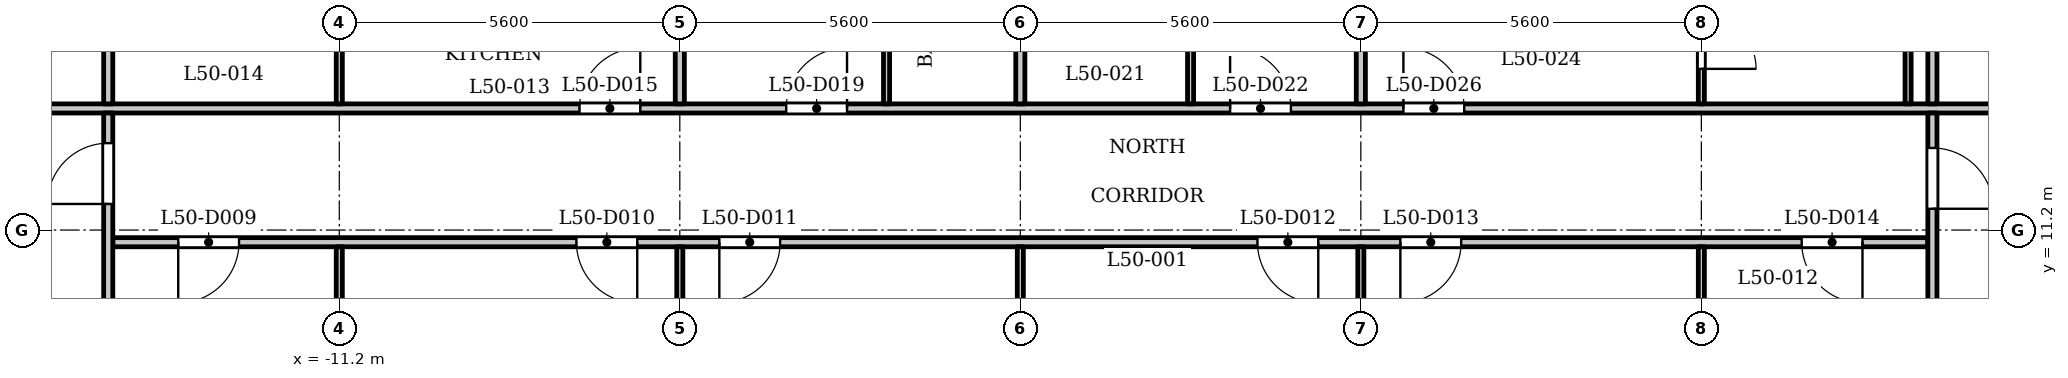
"""IFC4 building model, lengths in metres.
Left out: names, types, materials, properties, quantities, classifications, styles, units other than length and angle.
Written with IfcOpenShell. Run it as: python <this file> out.ifc"""

import sys

from ifc_helpers import new_model, si_unit, direction, frame, frame_2d, origin, place, context, subcontext, project, spatial, rectangle, extrude, element, fill, save


model = new_model("IFC4")
c1 = context("Model", 3, precision=1e-05, world=origin(), true_north=direction((0.0, 1.0)))
c2 = subcontext(c1, "Body", "Model", "MODEL_VIEW")
j1 = project(units=[si_unit("LENGTHUNIT", "METRE"), si_unit("PLANEANGLEUNIT", "RADIAN")], contexts=[c1])
p1 = place(None, origin())
s1 = spatial("IfcSite", under=j1, at=p1, CompositionType="ELEMENT")
p2 = place(p1, origin())
s2 = spatial("IfcBuilding", under=s1, at=p2, CompositionType="ELEMENT")
p3 = place(p2, frame((0.0, 0.0, 195.9)))
s3 = spatial("IfcBuildingStorey", under=s2, at=p3, CompositionType="ELEMENT", Elevation=195.9)
p4 = place(p3, frame((-14.925, 11.0, 0.0), z_axis=(0.0, 0.0, 1.0), x_axis=(1.0, 0.0, 0.0)))
e1 = element("IfcWall", 1, at=p4, inside=s3, PredefinedType="PARTITIONING", context=c2, shape_type="SweptSolid", body=[
    extrude(rectangle(XDim=29.85, YDim=0.15, at=frame_2d((14.925, 0.0))), origin(), (0.0, 0.0, 1.0), 3.2),
])
p5 = place(p4, frame((1.076, 0.0, 0.0)))
e2 = element("IfcOpeningElement", 2, at=p5, cuts=e1, PredefinedType="OPENING", context=c2, shape_type="SweptSolid", body=[
    extrude(rectangle(XDim=1.0, YDim=2.1, at=frame_2d((0.5, 1.05))), frame((0.0, 0.085, 0.0), z_axis=(0.0, -1.0, 0.0), x_axis=(1.0, 0.0, 0.0)), (0.0, 0.0, 1.0), 0.17),
])
p6 = place(p4, frame((7.625, 0.0, 0.0)))
e3 = element("IfcOpeningElement", 3, at=p6, cuts=e1, PredefinedType="OPENING", context=c2, shape_type="SweptSolid", body=[
    extrude(rectangle(XDim=1.0, YDim=2.1, at=frame_2d((0.5, 1.05))), frame((0.0, 0.085, 0.0), z_axis=(0.0, -1.0, 0.0), x_axis=(1.0, 0.0, 0.0)), (0.0, 0.0, 1.0), 0.17),
])
p7 = place(p4, frame((9.975, 0.0, 0.0)))
e4 = element("IfcOpeningElement", 4, at=p7, cuts=e1, PredefinedType="OPENING", context=c2, shape_type="SweptSolid", body=[
    extrude(rectangle(XDim=1.0, YDim=2.1, at=frame_2d((0.5, 1.05))), frame((0.0, 0.085, 0.0), z_axis=(0.0, -1.0, 0.0), x_axis=(1.0, 0.0, 0.0)), (0.0, 0.0, 1.0), 0.17),
])
p8 = place(p4, frame((18.825, 0.0, 0.0)))
e5 = element("IfcOpeningElement", 5, at=p8, cuts=e1, PredefinedType="OPENING", context=c2, shape_type="SweptSolid", body=[
    extrude(rectangle(XDim=1.0, YDim=2.1, at=frame_2d((0.5, 1.05))), frame((0.0, 0.085, 0.0), z_axis=(0.0, -1.0, 0.0), x_axis=(1.0, 0.0, 0.0)), (0.0, 0.0, 1.0), 0.17),
])
p9 = place(p4, frame((21.175, 0.0, 0.0)))
e6 = element("IfcOpeningElement", 6, at=p9, cuts=e1, PredefinedType="OPENING", context=c2, shape_type="SweptSolid", body=[
    extrude(rectangle(XDim=1.0, YDim=2.1, at=frame_2d((0.5, 1.05))), frame((0.0, 0.085, 0.0), z_axis=(0.0, -1.0, 0.0), x_axis=(1.0, 0.0, 0.0)), (0.0, 0.0, 1.0), 0.17),
])
p10 = place(p4, frame((27.775, 0.0, 0.0)))
e7 = element("IfcOpeningElement", 7, at=p10, cuts=e1, PredefinedType="OPENING", context=c2, shape_type="SweptSolid", body=[
    extrude(rectangle(XDim=1.0, YDim=2.1, at=frame_2d((0.5, 1.05))), frame((0.0, 0.085, 0.0), z_axis=(0.0, -1.0, 0.0), x_axis=(1.0, 0.0, 0.0)), (0.0, 0.0, 1.0), 0.17),
])
p11 = place(p3, frame((-17.4, 13.2, 0.0), z_axis=(0.0, 0.0, 1.0), x_axis=(1.0, 0.0, 0.0)))
e8 = element("IfcWall", 8, at=p11, inside=s3, PredefinedType="PARTITIONING", context=c2, shape_type="SweptSolid", body=[
    extrude(rectangle(XDim=34.8, YDim=0.15, at=frame_2d((17.4, 0.0))), origin(), (0.0, 0.0, 1.0), 3.2),
])
p12 = place(p11, frame((0.25, 0.0, 0.0)))
e9 = element("IfcOpeningElement", 9, at=p12, cuts=e8, PredefinedType="OPENING", context=c2, shape_type="SweptSolid", body=[
    extrude(rectangle(XDim=1.0, YDim=2.1, at=frame_2d((0.5, 1.05))), frame((0.0, 0.085, 0.0), z_axis=(0.0, -1.0, 0.0), x_axis=(1.0, 0.0, 0.0)), (0.0, 0.0, 1.0), 0.17),
])
p13 = place(p11, frame((33.65, 0.0, 0.0)))
e10 = element("IfcOpeningElement", 10, at=p13, cuts=e8, PredefinedType="OPENING", context=c2, shape_type="SweptSolid", body=[
    extrude(rectangle(XDim=1.0, YDim=2.1, at=frame_2d((0.5, 1.05))), frame((0.0, 0.085, 0.0), z_axis=(0.0, -1.0, 0.0), x_axis=(1.0, 0.0, 0.0)), (0.0, 0.0, 1.0), 0.17),
])
p14 = place(p11, frame((10.15, 0.0, 0.0)))
e11 = element("IfcOpeningElement", 11, at=p14, cuts=e8, PredefinedType="OPENING", context=c2, shape_type="SweptSolid", body=[
    extrude(rectangle(XDim=1.0, YDim=2.1, at=frame_2d((0.5, 1.05))), frame((0.0, 0.085, 0.0), z_axis=(0.0, -1.0, 0.0), x_axis=(1.0, 0.0, 0.0)), (0.0, 0.0, 1.0), 0.17),
])
p15 = place(p11, frame((13.55, 0.0, 0.0)))
e12 = element("IfcOpeningElement", 12, at=p15, cuts=e8, PredefinedType="OPENING", context=c2, shape_type="SweptSolid", body=[
    extrude(rectangle(XDim=1.0, YDim=2.1, at=frame_2d((0.5, 1.05))), frame((0.0, 0.085, 0.0), z_axis=(0.0, -1.0, 0.0), x_axis=(1.0, 0.0, 0.0)), (0.0, 0.0, 1.0), 0.17),
])
p16 = place(p11, frame((20.85, 0.0, 0.0)))
e13 = element("IfcOpeningElement", 13, at=p16, cuts=e8, PredefinedType="OPENING", context=c2, shape_type="SweptSolid", body=[
    extrude(rectangle(XDim=1.0, YDim=2.1, at=frame_2d((0.5, 1.05))), frame((0.0, 0.085, 0.0), z_axis=(0.0, -1.0, 0.0), x_axis=(1.0, 0.0, 0.0)), (0.0, 0.0, 1.0), 0.17),
])
p17 = place(p11, frame((23.7, 0.0, 0.0)))
e14 = element("IfcOpeningElement", 14, at=p17, cuts=e8, PredefinedType="OPENING", context=c2, shape_type="SweptSolid", body=[
    extrude(rectangle(XDim=1.0, YDim=2.1, at=frame_2d((0.5, 1.05))), frame((0.0, 0.085, 0.0), z_axis=(0.0, -1.0, 0.0), x_axis=(1.0, 0.0, 0.0)), (0.0, 0.0, 1.0), 0.17),
])
p18 = place(p3, frame((-15.0, 6.769, 0.0), z_axis=(0.0, 0.0, 1.0), x_axis=(0.0, 1.0, 0.0)))
e15 = element("IfcWall", 15, at=p18, inside=s3, PredefinedType="PARTITIONING", context=c2, shape_type="SweptSolid", body=[
    extrude(rectangle(XDim=6.356, YDim=0.15, at=frame_2d((3.178, 0.0))), origin(), (0.0, 0.0, 1.0), 3.2),
])
p19 = place(p18, frame((4.86, 0.0, 0.0)))
e16 = element("IfcOpeningElement", 16, at=p19, cuts=e15, PredefinedType="OPENING", context=c2, shape_type="SweptSolid", body=[
    extrude(rectangle(XDim=1.0, YDim=2.1, at=frame_2d((0.5, 1.05))), frame((0.0, 0.085, 0.0), z_axis=(0.0, -1.0, 0.0), x_axis=(1.0, 0.0, 0.0)), (0.0, 0.0, 1.0), 0.17),
])
p20 = place(p3, frame((-15.0, 13.275, 0.0), z_axis=(0.0, 0.0, 1.0), x_axis=(0.0, 1.0, 0.0)))
e17 = element("IfcWall", 17, at=p20, inside=s3, PredefinedType="PARTITIONING", context=c2, shape_type="SweptSolid", body=[
    extrude(rectangle(XDim=2.05, YDim=0.15, at=frame_2d((1.025, 0.0))), origin(), (0.0, 0.0, 1.0), 3.2),
])
p21 = place(p3, frame((-11.2, 7.32, 0.0), z_axis=(0.0, 0.0, 1.0), x_axis=(0.0, 1.0, 0.0)))
e18 = element("IfcWall", 18, at=p21, inside=s3, PredefinedType="PARTITIONING", context=c2, shape_type="SweptSolid", body=[
    extrude(rectangle(XDim=3.605, YDim=0.1, at=frame_2d((1.802, 0.0))), origin(), (0.0, 0.0, 1.0), 3.2),
])
p22 = place(p3, frame((-11.2, 13.275, 0.0), z_axis=(0.0, 0.0, 1.0), x_axis=(0.0, 1.0, 0.0)))
e19 = element("IfcWall", 19, at=p22, inside=s3, PredefinedType="PARTITIONING", context=c2, shape_type="SweptSolid", body=[
    extrude(rectangle(XDim=3.775, YDim=0.1, at=frame_2d((1.888, 0.0))), origin(), (0.0, 0.0, 1.0), 3.2),
])
p23 = place(p3, frame((-5.6, 7.32, 0.0), z_axis=(0.0, 0.0, 1.0), x_axis=(0.0, 1.0, 0.0)))
e20 = element("IfcWall", 20, at=p23, inside=s3, PredefinedType="PARTITIONING", context=c2, shape_type="SweptSolid", body=[
    extrude(rectangle(XDim=3.605, YDim=0.1, at=frame_2d((1.802, 0.0))), origin(), (0.0, 0.0, 1.0), 3.2),
])
p24 = place(p3, frame((-5.6, 13.275, 0.0), z_axis=(0.0, 0.0, 1.0), x_axis=(0.0, 1.0, 0.0)))
e21 = element("IfcWall", 21, at=p24, inside=s3, PredefinedType="PARTITIONING", context=c2, shape_type="SweptSolid", body=[
    extrude(rectangle(XDim=3.775, YDim=0.15, at=frame_2d((1.888, 0.0))), origin(), (0.0, 0.0, 1.0), 3.2),
])
p25 = place(p3, frame((-2.2, 13.275, 0.0), z_axis=(0.0, 0.0, 1.0), x_axis=(0.0, 1.0, 0.0)))
e22 = element("IfcWall", 22, at=p25, inside=s3, PredefinedType="PARTITIONING", context=c2, shape_type="SweptSolid", body=[
    extrude(rectangle(XDim=3.775, YDim=0.1, at=frame_2d((1.888, 0.0))), origin(), (0.0, 0.0, 1.0), 3.2),
])
p26 = place(p3, frame((0.0, 7.32, 0.0), z_axis=(0.0, 0.0, 1.0), x_axis=(0.0, 1.0, 0.0)))
e23 = element("IfcWall", 23, at=p26, inside=s3, PredefinedType="PARTITIONING", context=c2, shape_type="SweptSolid", body=[
    extrude(rectangle(XDim=3.605, YDim=0.1, at=frame_2d((1.802, 0.0))), origin(), (0.0, 0.0, 1.0), 3.2),
])
p27 = place(p3, frame((0.0, 13.275, 0.0), z_axis=(0.0, 0.0, 1.0), x_axis=(0.0, 1.0, 0.0)))
e24 = element("IfcWall", 24, at=p27, inside=s3, PredefinedType="PARTITIONING", context=c2, shape_type="SweptSolid", body=[
    extrude(rectangle(XDim=3.775, YDim=0.15, at=frame_2d((1.888, 0.0))), origin(), (0.0, 0.0, 1.0), 3.2),
])
p28 = place(p3, frame((2.8, 13.275, 0.0), z_axis=(0.0, 0.0, 1.0), x_axis=(0.0, 1.0, 0.0)))
e25 = element("IfcWall", 25, at=p28, inside=s3, PredefinedType="PARTITIONING", context=c2, shape_type="SweptSolid", body=[
    extrude(rectangle(XDim=3.775, YDim=0.1, at=frame_2d((1.888, 0.0))), origin(), (0.0, 0.0, 1.0), 3.2),
])
p29 = place(p3, frame((5.6, 7.32, 0.0), z_axis=(0.0, 0.0, 1.0), x_axis=(0.0, 1.0, 0.0)))
e26 = element("IfcWall", 26, at=p29, inside=s3, PredefinedType="PARTITIONING", context=c2, shape_type="SweptSolid", body=[
    extrude(rectangle(XDim=3.605, YDim=0.1, at=frame_2d((1.802, 0.0))), origin(), (0.0, 0.0, 1.0), 3.2),
])
p30 = place(p3, frame((5.6, 13.275, 0.0), z_axis=(0.0, 0.0, 1.0), x_axis=(0.0, 1.0, 0.0)))
e27 = element("IfcWall", 27, at=p30, inside=s3, PredefinedType="PARTITIONING", context=c2, shape_type="SweptSolid", body=[
    extrude(rectangle(XDim=3.775, YDim=0.15, at=frame_2d((1.888, 0.0))), origin(), (0.0, 0.0, 1.0), 3.2),
])
p31 = place(p3, frame((11.2, 7.32, 0.0), z_axis=(0.0, 0.0, 1.0), x_axis=(0.0, 1.0, 0.0)))
e28 = element("IfcWall", 28, at=p31, inside=s3, PredefinedType="PARTITIONING", context=c2, shape_type="SweptSolid", body=[
    extrude(rectangle(XDim=3.605, YDim=0.1, at=frame_2d((1.802, 0.0))), origin(), (0.0, 0.0, 1.0), 3.2),
])
p32 = place(p3, frame((11.2, 13.275, 0.0), z_axis=(0.0, 0.0, 1.0), x_axis=(0.0, 1.0, 0.0)))
e29 = element("IfcWall", 29, at=p32, inside=s3, PredefinedType="PARTITIONING", context=c2, shape_type="SweptSolid", body=[
    extrude(rectangle(XDim=3.775, YDim=0.1, at=frame_2d((1.888, 0.0))), origin(), (0.0, 0.0, 1.0), 3.2),
])
p33 = place(p32, frame((0.576, 0.0, 0.0)))
e30 = element("IfcOpeningElement", 30, at=p33, cuts=e29, PredefinedType="OPENING", context=c2, shape_type="SweptSolid", body=[
    extrude(rectangle(XDim=0.9, YDim=2.1, at=frame_2d((0.45, 1.05))), frame((0.0, 0.06, 0.0), z_axis=(0.0, -1.0, 0.0), x_axis=(1.0, 0.0, 0.0)), (0.0, 0.0, 1.0), 0.12),
])
p34 = place(p3, frame((14.6, 13.275, 0.0), z_axis=(0.0, 0.0, 1.0), x_axis=(0.0, 1.0, 0.0)))
e31 = element("IfcWall", 31, at=p34, inside=s3, PredefinedType="PARTITIONING", context=c2, shape_type="SweptSolid", body=[
    extrude(rectangle(XDim=3.775, YDim=0.1, at=frame_2d((1.888, 0.0))), origin(), (0.0, 0.0, 1.0), 3.2),
])
p35 = place(p3, frame((15.0, 6.769, 0.0), z_axis=(0.0, 0.0, 1.0), x_axis=(0.0, 1.0, 0.0)))
e32 = element("IfcWall", 32, at=p35, inside=s3, PredefinedType="PARTITIONING", context=c2, shape_type="SweptSolid", body=[
    extrude(rectangle(XDim=6.356, YDim=0.15, at=frame_2d((3.178, 0.0))), origin(), (0.0, 0.0, 1.0), 3.2),
])
p36 = place(p35, frame((4.781, 0.0, 0.0)))
e33 = element("IfcOpeningElement", 33, at=p36, cuts=e32, PredefinedType="OPENING", context=c2, shape_type="SweptSolid", body=[
    extrude(rectangle(XDim=1.0, YDim=2.1, at=frame_2d((0.5, 1.05))), frame((0.0, 0.085, 0.0), z_axis=(0.0, -1.0, 0.0), x_axis=(1.0, 0.0, 0.0)), (0.0, 0.0, 1.0), 0.17),
])
p37 = place(p3, frame((15.0, 13.275, 0.0), z_axis=(0.0, 0.0, 1.0), x_axis=(0.0, 1.0, 0.0)))
e34 = element("IfcWall", 34, at=p37, inside=s3, PredefinedType="PARTITIONING", context=c2, shape_type="SweptSolid", body=[
    extrude(rectangle(XDim=2.05, YDim=0.15, at=frame_2d((1.025, 0.0))), origin(), (0.0, 0.0, 1.0), 3.2),
])
p38 = place(p19, origin())
e35 = element("IfcDoor", 35, at=p38, inside=s3, OperationType="SINGLE_SWING_RIGHT", PredefinedType="DOOR", context=c2, shape_type="SweptSolid", body=[
    extrude(rectangle(XDim=1.0, YDim=2.1, at=frame_2d((0.5, 1.05))), frame((0.0, 0.025, 0.0), z_axis=(0.0, -1.0, 0.0), x_axis=(1.0, 0.0, 0.0)), (0.0, 0.0, 1.0), 0.05),
])
fill(e16, e35)
p39 = place(p36, origin())
e36 = element("IfcDoor", 36, at=p39, inside=s3, OperationType="SINGLE_SWING_LEFT", PredefinedType="DOOR", context=c2, shape_type="SweptSolid", body=[
    extrude(rectangle(XDim=1.0, YDim=2.1, at=frame_2d((0.5, 1.05))), frame((0.0, 0.025, 0.0), z_axis=(0.0, -1.0, 0.0), x_axis=(1.0, 0.0, 0.0)), (0.0, 0.0, 1.0), 0.05),
])
fill(e33, e36)
p40 = place(p5, origin())
e37 = element("IfcDoor", 37, at=p40, inside=s3, OperationType="SINGLE_SWING_LEFT", PredefinedType="DOOR", context=c2, shape_type="SweptSolid", body=[
    extrude(rectangle(XDim=1.0, YDim=2.1, at=frame_2d((0.5, 1.05))), frame((0.0, 0.025, 0.0), z_axis=(0.0, -1.0, 0.0), x_axis=(1.0, 0.0, 0.0)), (0.0, 0.0, 1.0), 0.05),
])
fill(e2, e37)
p41 = place(p6, origin())
e38 = element("IfcDoor", 38, at=p41, inside=s3, OperationType="SINGLE_SWING_RIGHT", PredefinedType="DOOR", context=c2, shape_type="SweptSolid", body=[
    extrude(rectangle(XDim=1.0, YDim=2.1, at=frame_2d((0.5, 1.05))), frame((0.0, 0.025, 0.0), z_axis=(0.0, -1.0, 0.0), x_axis=(1.0, 0.0, 0.0)), (0.0, 0.0, 1.0), 0.05),
])
fill(e3, e38)
p42 = place(p7, origin())
e39 = element("IfcDoor", 39, at=p42, inside=s3, OperationType="SINGLE_SWING_LEFT", PredefinedType="DOOR", context=c2, shape_type="SweptSolid", body=[
    extrude(rectangle(XDim=1.0, YDim=2.1, at=frame_2d((0.5, 1.05))), frame((0.0, 0.025, 0.0), z_axis=(0.0, -1.0, 0.0), x_axis=(1.0, 0.0, 0.0)), (0.0, 0.0, 1.0), 0.05),
])
fill(e4, e39)
p43 = place(p8, origin())
e40 = element("IfcDoor", 40, at=p43, inside=s3, OperationType="SINGLE_SWING_RIGHT", PredefinedType="DOOR", context=c2, shape_type="SweptSolid", body=[
    extrude(rectangle(XDim=1.0, YDim=2.1, at=frame_2d((0.5, 1.05))), frame((0.0, 0.025, 0.0), z_axis=(0.0, -1.0, 0.0), x_axis=(1.0, 0.0, 0.0)), (0.0, 0.0, 1.0), 0.05),
])
fill(e5, e40)
p44 = place(p9, origin())
e41 = element("IfcDoor", 41, at=p44, inside=s3, OperationType="SINGLE_SWING_LEFT", PredefinedType="DOOR", context=c2, shape_type="SweptSolid", body=[
    extrude(rectangle(XDim=1.0, YDim=2.1, at=frame_2d((0.5, 1.05))), frame((0.0, 0.025, 0.0), z_axis=(0.0, -1.0, 0.0), x_axis=(1.0, 0.0, 0.0)), (0.0, 0.0, 1.0), 0.05),
])
fill(e6, e41)
p45 = place(p10, origin())
e42 = element("IfcDoor", 42, at=p45, inside=s3, OperationType="SINGLE_SWING_RIGHT", PredefinedType="DOOR", context=c2, shape_type="SweptSolid", body=[
    extrude(rectangle(XDim=1.0, YDim=2.1, at=frame_2d((0.5, 1.05))), frame((0.0, 0.025, 0.0), z_axis=(0.0, -1.0, 0.0), x_axis=(1.0, 0.0, 0.0)), (0.0, 0.0, 1.0), 0.05),
])
fill(e7, e42)
p46 = place(p14, origin())
e43 = element("IfcDoor", 43, at=p46, inside=s3, OperationType="SINGLE_SWING_LEFT", PredefinedType="DOOR", context=c2, shape_type="SweptSolid", body=[
    extrude(rectangle(XDim=1.0, YDim=2.1, at=frame_2d((0.5, 1.05))), frame((0.0, 0.025, 0.0), z_axis=(0.0, -1.0, 0.0), x_axis=(1.0, 0.0, 0.0)), (0.0, 0.0, 1.0), 0.05),
])
fill(e11, e43)
p47 = place(p15, origin())
e44 = element("IfcDoor", 44, at=p47, inside=s3, OperationType="SINGLE_SWING_LEFT", PredefinedType="DOOR", context=c2, shape_type="SweptSolid", body=[
    extrude(rectangle(XDim=1.0, YDim=2.1, at=frame_2d((0.5, 1.05))), frame((0.0, 0.025, 0.0), z_axis=(0.0, -1.0, 0.0), x_axis=(1.0, 0.0, 0.0)), (0.0, 0.0, 1.0), 0.05),
])
fill(e12, e44)
p48 = place(p16, origin())
e45 = element("IfcDoor", 45, at=p48, inside=s3, OperationType="SINGLE_SWING_RIGHT", PredefinedType="DOOR", context=c2, shape_type="SweptSolid", body=[
    extrude(rectangle(XDim=1.0, YDim=2.1, at=frame_2d((0.5, 1.05))), frame((0.0, 0.025, 0.0), z_axis=(0.0, -1.0, 0.0), x_axis=(1.0, 0.0, 0.0)), (0.0, 0.0, 1.0), 0.05),
])
fill(e13, e45)
p49 = place(p17, origin())
e46 = element("IfcDoor", 46, at=p49, inside=s3, OperationType="SINGLE_SWING_RIGHT", PredefinedType="DOOR", context=c2, shape_type="SweptSolid", body=[
    extrude(rectangle(XDim=1.0, YDim=2.1, at=frame_2d((0.5, 1.05))), frame((0.0, 0.025, 0.0), z_axis=(0.0, -1.0, 0.0), x_axis=(1.0, 0.0, 0.0)), (0.0, 0.0, 1.0), 0.05),
])
fill(e14, e46)
p50 = place(p33, origin())
e47 = element("IfcDoor", 47, at=p50, inside=s3, OperationType="SINGLE_SWING_LEFT", PredefinedType="DOOR", context=c2, shape_type="SweptSolid", body=[
    extrude(rectangle(XDim=0.9, YDim=2.1, at=frame_2d((0.45, 1.05))), frame((0.0, 0.025, 0.0), z_axis=(0.0, -1.0, 0.0), x_axis=(1.0, 0.0, 0.0)), (0.0, 0.0, 1.0), 0.05),
])
fill(e30, e47)
save(model, sys.argv[1])
